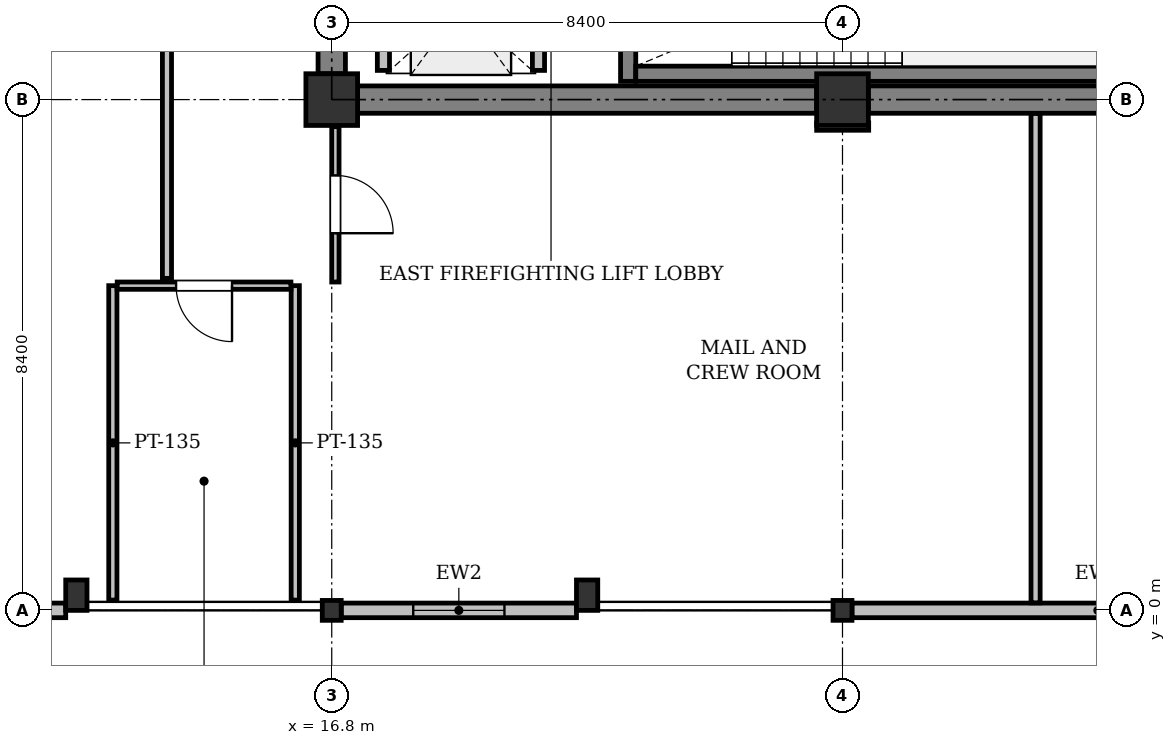
"""IFC4 building model, lengths in metres.
Left out: names, types, materials, properties, quantities, classifications, styles, units other than length and angle.
Written with IfcOpenShell. Run it as: python <this file> out.ifc"""

import sys

from ifc_helpers import new_model, si_unit, direction, frame, frame_2d, origin, origin_2d, place, context, subcontext, project, spatial, rectangle, i_section, extrude, element, fill, save


model = new_model("IFC4")
c1 = context("Model", 3, precision=1e-05, world=origin(), true_north=direction((0.0, 1.0)))
c2 = subcontext(c1, "Body", "Model", "MODEL_VIEW")
j1 = project(units=[si_unit("LENGTHUNIT", "METRE"), si_unit("PLANEANGLEUNIT", "RADIAN")], contexts=[c1])
p1 = place(None, origin())
s1 = spatial("IfcSite", under=j1, at=p1, CompositionType="ELEMENT")
p2 = place(p1, origin())
s2 = spatial("IfcBuilding", under=s1, at=p2, CompositionType="ELEMENT")
p3 = place(p2, frame((0.0, 0.0, 262.2)))
s3 = spatial("IfcBuildingStorey", under=s2, at=p3, CompositionType="ELEMENT", Elevation=262.2)
p4 = place(p3, frame((16.8, 0.0, 0.0), z_axis=(0.0, 0.0, 1.0), x_axis=(1.0, 0.0, 0.0)))
e1 = element("IfcColumn", 1, at=p4, inside=s3, PredefinedType="COLUMN", context=c2, shape_type="SweptSolid", body=[
    extrude(i_section(OverallWidth=0.311, OverallDepth=0.327, WebThickness=0.016, FlangeThickness=0.025, FilletRadius=0.017, at=origin_2d()), origin(), (0.0, 0.0, 1.0), 4.0),
])
p5 = place(p3, frame((16.8, 8.4, 0.0), z_axis=(0.0, 0.0, 1.0), x_axis=(1.0, 0.0, 0.0)))
e2 = element("IfcColumn", 2, at=p5, inside=s3, PredefinedType="COLUMN", context=c2, shape_type="SweptSolid", body=[
    extrude(rectangle(XDim=0.85, YDim=0.85, at=origin_2d()), origin(), (0.0, 0.0, 1.0), 4.0),
])
p6 = place(p3, frame((25.2, 0.0, 0.0), z_axis=(0.0, 0.0, 1.0), x_axis=(1.0, 0.0, 0.0)))
e3 = element("IfcColumn", 3, at=p6, inside=s3, PredefinedType="COLUMN", context=c2, shape_type="SweptSolid", body=[
    extrude(i_section(OverallWidth=0.311, OverallDepth=0.327, WebThickness=0.016, FlangeThickness=0.025, FilletRadius=0.017, at=origin_2d()), origin(), (0.0, 0.0, 1.0), 4.0),
])
p7 = place(p3, frame((25.2, 8.4, 0.0), z_axis=(0.0, 0.0, 1.0), x_axis=(1.0, 0.0, 0.0)))
e4 = element("IfcColumn", 4, at=p7, inside=s3, PredefinedType="COLUMN", context=c2, shape_type="SweptSolid", body=[
    extrude(rectangle(XDim=0.85, YDim=0.85, at=origin_2d()), origin(), (0.0, 0.0, 1.0), 4.0),
])
for number, where, z_axis, x_axis in (
    (5, (12.6, 0.25, 0.0), (0.0, 0.0, 1.0), (1.0, 0.0, 0.0)),
    (6, (21.0, 0.25, 0.0), (0.0, 0.0, 1.0), (1.0, 0.0, 0.0)),
):
    element("IfcColumn", number, at=place(p3, frame(where, z_axis=z_axis, x_axis=x_axis)), inside=s3, PredefinedType="PILASTER", context=c2, shape_type="SweptSolid", body=[
        extrude(rectangle(XDim=0.35, YDim=0.5, at=origin_2d()), origin(), (0.0, 0.0, 1.0), 4.0),
    ])
p8 = place(p3, frame((33.445, 0.0, 0.0), z_axis=(0.0, 0.0, 1.0), x_axis=(-1.0, 0.0, 0.0)))
e7 = element("IfcWall", 7, at=p8, inside=s3, PredefinedType="STANDARD", context=c2, shape_type="SweptSolid", body=[
    extrude(rectangle(XDim=8.089, YDim=0.24, at=frame_2d((4.044, 0.0))), origin(), (0.0, 0.0, 1.0), 3.475),
])
p9 = place(p8, frame((1.77, 0.0, 0.9)))
e8 = element("IfcOpeningElement", 8, at=p9, cuts=e7, PredefinedType="OPENING", context=c2, shape_type="SweptSolid", body=[
    extrude(rectangle(XDim=1.5, YDim=1.6, at=frame_2d((0.75, 0.8))), frame((0.0, 0.13, 0.0), z_axis=(0.0, -1.0, 0.0), x_axis=(1.0, 0.0, 0.0)), (0.0, 0.0, 1.0), 0.26),
])
p10 = place(p3, frame((20.825, 0.0, 0.0), z_axis=(0.0, 0.0, 1.0), x_axis=(-1.0, 0.0, 0.0)))
e9 = element("IfcWall", 9, at=p10, inside=s3, PredefinedType="STANDARD", context=c2, shape_type="SweptSolid", body=[
    extrude(rectangle(XDim=3.869, YDim=0.24, at=frame_2d((1.935, 0.0))), origin(), (0.0, 0.0, 1.0), 3.475),
])
p11 = place(p10, frame((1.185, 0.0, 0.9)))
e10 = element("IfcOpeningElement", 10, at=p11, cuts=e9, PredefinedType="OPENING", context=c2, shape_type="SweptSolid", body=[
    extrude(rectangle(XDim=1.5, YDim=1.6, at=frame_2d((0.75, 0.8))), frame((0.0, 0.13, 0.0), z_axis=(0.0, -1.0, 0.0), x_axis=(1.0, 0.0, 0.0)), (0.0, 0.0, 1.0), 0.26),
])
p12 = place(p3, frame((12.425, 0.0, 0.0), z_axis=(0.0, 0.0, 1.0), x_axis=(-1.0, 0.0, 0.0)))
e11 = element("IfcWall", 11, at=p12, inside=s3, PredefinedType="STANDARD", context=c2, shape_type="SweptSolid", body=[
    extrude(rectangle(XDim=3.87, YDim=0.24, at=frame_2d((1.935, 0.0))), origin(), (0.0, 0.0, 1.0), 3.475),
])
p13 = place(p12, frame((1.185, 0.0, 0.9)))
e12 = element("IfcOpeningElement", 12, at=p13, cuts=e11, PredefinedType="OPENING", context=c2, shape_type="SweptSolid", body=[
    extrude(rectangle(XDim=1.5, YDim=1.6, at=frame_2d((0.75, 0.8))), frame((0.0, 0.13, 0.0), z_axis=(0.0, -1.0, 0.0), x_axis=(1.0, 0.0, 0.0)), (0.0, 0.0, 1.0), 0.26),
])
p14 = place(p3, frame((17.225, 8.4, 0.0), z_axis=(0.0, 0.0, 1.0), x_axis=(1.0, 0.0, 0.0)))
e13 = element("IfcWall", 13, at=p14, inside=s3, PredefinedType="SHEAR", context=c2, shape_type="SweptSolid", body=[
    extrude(rectangle(XDim=7.55, YDim=0.45, at=frame_2d((3.775, 0.0))), origin(), (0.0, 0.0, 1.0), 3.725),
])
p15 = place(p3, frame((25.625, 8.4, 0.0), z_axis=(0.0, 0.0, 1.0), x_axis=(1.0, 0.0, 0.0)))
e14 = element("IfcWall", 14, at=p15, inside=s3, PredefinedType="SHEAR", context=c2, shape_type="SweptSolid", body=[
    extrude(rectangle(XDim=7.55, YDim=0.45, at=frame_2d((3.775, 0.0))), origin(), (0.0, 0.0, 1.0), 3.725),
])
p16 = place(p3, frame((16.8, 8.825, 0.0), z_axis=(0.0, 0.0, 1.0), x_axis=(0.0, 1.0, 0.0)))
e15 = element("IfcWall", 15, at=p16, inside=s3, PredefinedType="SHEAR", context=c2, shape_type="SweptSolid", body=[
    extrude(rectangle(XDim=7.55, YDim=0.45, at=frame_2d((3.775, 0.0))), origin(), (0.0, 0.0, 1.0), 3.725),
])
p17 = place(p16, frame((3.425, 0.0, 0.0)))
e16 = element("IfcOpeningElement", 16, at=p17, cuts=e15, PredefinedType="OPENING", context=c2, shape_type="SweptSolid", body=[
    extrude(rectangle(XDim=1.1, YDim=2.15, at=frame_2d((0.55, 1.075))), frame((0.0, 0.235, 0.0), z_axis=(0.0, -1.0, 0.0), x_axis=(1.0, 0.0, 0.0)), (0.0, 0.0, 1.0), 0.47),
])
p18 = place(p3, frame((21.675, 8.7, 0.0), z_axis=(0.0, 0.0, 1.0), x_axis=(0.0, 1.0, 0.0)))
e17 = element("IfcWall", 17, at=p18, inside=s3, PredefinedType="SHEAR", context=c2, shape_type="SweptSolid", body=[
    extrude(rectangle(XDim=3.75, YDim=0.25, at=frame_2d((1.875, 0.0))), origin(), (0.0, 0.0, 1.0), 3.725),
])
p19 = place(p3, frame((21.8, 8.825, 0.0), z_axis=(0.0, 0.0, 1.0), x_axis=(1.0, 0.0, 0.0)))
e18 = element("IfcWall", 18, at=p19, inside=s3, PredefinedType="SHEAR", context=c2, shape_type="SweptSolid", body=[
    extrude(rectangle(XDim=7.75, YDim=0.25, at=frame_2d((3.875, 0.0))), origin(), (0.0, 0.0, 1.0), 3.725),
])
for number, where, z_axis, x_axis in (
    (19, (20.2, 8.88, 0.0), (0.0, 0.0, 1.0), (0.0, 1.0, 0.0)),
    (20, (17.65, 8.88, 0.0), (0.0, 0.0, 1.0), (0.0, 1.0, 0.0)),
):
    element("IfcWall", number, at=place(p3, frame(where, z_axis=z_axis, x_axis=x_axis)), inside=s3, PredefinedType="PARTITIONING", context=c2, shape_type="SweptSolid", body=[
        extrude(rectangle(XDim=2.1, YDim=0.2, at=frame_2d((1.05, 0.0))), origin(), (0.0, 0.0, 1.0), 3.725),
    ])
for number, where, z_axis, x_axis in (
    (21, (13.2, 5.34, 0.0), (0.0, 0.0, 1.0), (0.0, -1.0, 0.0)),
    (22, (16.2, 0.169, 0.0), (0.0, 0.0, 1.0), (0.0, 1.0, 0.0)),
):
    element("IfcWall", number, at=place(p3, frame(where, z_axis=z_axis, x_axis=x_axis)), inside=s3, PredefinedType="PARTITIONING", context=c2, shape_type="SweptSolid", body=[
        extrude(rectangle(XDim=5.171, YDim=0.135, at=frame_2d((2.585, 0.0))), origin(), (0.0, 0.0, 1.0), 3.725),
    ])
p20 = place(p3, frame((16.128, 5.34, 0.0), z_axis=(0.0, 0.0, 1.0), x_axis=(-1.0, 0.0, 0.0)))
e23 = element("IfcWall", 23, at=p20, inside=s3, PredefinedType="PARTITIONING", context=c2, shape_type="SweptSolid", body=[
    extrude(rectangle(XDim=2.857, YDim=0.12, at=frame_2d((1.428, 0.0))), origin(), (0.0, 0.0, 1.0), 3.725),
])
p21 = place(p20, frame((0.969, 0.0, 0.0)))
e24 = element("IfcOpeningElement", 24, at=p21, cuts=e23, PredefinedType="OPENING", context=c2, shape_type="SweptSolid", body=[
    extrude(rectangle(XDim=0.92, YDim=2.1, at=frame_2d((0.46, 1.05))), frame((0.0, 0.07, 0.0), z_axis=(0.0, -1.0, 0.0), x_axis=(1.0, 0.0, 0.0)), (0.0, 0.0, 1.0), 0.14),
])
p22 = place(p3, frame((28.375, 0.124, 0.0), z_axis=(0.0, 0.0, 1.0), x_axis=(0.0, 1.0, 0.0)))
e25 = element("IfcWall", 25, at=p22, inside=s3, PredefinedType="PARTITIONING", context=c2, shape_type="SweptSolid", body=[
    extrude(rectangle(XDim=8.047, YDim=0.15, at=frame_2d((4.023, 0.0))), origin(), (0.0, 0.0, 1.0), 3.725),
])
p23 = place(p3, frame((25.631, 7.956, 0.0), z_axis=(0.0, 0.0, 1.0), x_axis=(-0.99999963391, -0.000855675671, 0.0)))
e26 = element("IfcWall", 26, at=p23, inside=s3, PredefinedType="PARTITIONING", context=c2, shape_type="SweptSolid", body=[
    extrude(rectangle(XDim=0.856, YDim=0.12, at=frame_2d((0.428, 0.0))), origin(), (0.0, 0.0, 1.0), 3.319),
])
p24 = place(p3, frame((16.86, 7.955, 0.0), z_axis=(0.0, 0.0, 1.0), x_axis=(0.0, -1.0, 0.0)))
e27 = element("IfcWall", 27, at=p24, inside=s3, PredefinedType="PARTITIONING", context=c2, shape_type="SweptSolid", body=[
    extrude(rectangle(XDim=2.555, YDim=0.12, at=frame_2d((1.278, 0.0))), origin(), (0.0, 0.0, 1.0), 3.319),
])
p25 = place(p24, frame((0.802, 0.0, 0.0)))
e28 = element("IfcOpeningElement", 28, at=p25, cuts=e27, PredefinedType="OPENING", context=c2, shape_type="SweptSolid", body=[
    extrude(rectangle(XDim=0.95, YDim=2.15, at=frame_2d((0.475, 1.075))), frame((0.0, 0.07, 0.0), z_axis=(0.0, -1.0, 0.0), x_axis=(1.0, 0.0, 0.0)), (0.0, 0.0, 1.0), 0.14),
])
p26 = place(p3, frame((14.09, 5.46, 0.0), z_axis=(0.0, 0.0, 1.0), x_axis=(0.0, 1.0, 0.0)))
e29 = element("IfcWall", 29, at=p26, inside=s3, PredefinedType="PARTITIONING", context=c2, shape_type="SweptSolid", body=[
    extrude(rectangle(XDim=7.88, YDim=0.15, at=frame_2d((3.94, 0.0))), origin(), (0.0, 0.0, 1.0), 3.271),
])
p27 = place(p11, origin())
e30 = element("IfcWindow", 30, at=p27, inside=s3, PartitioningType="SINGLE_PANEL", PredefinedType="WINDOW", context=c2, shape_type="SweptSolid", body=[
    extrude(rectangle(XDim=1.5, YDim=1.6, at=frame_2d((0.75, 0.8))), frame((0.0, 0.03, 0.0), z_axis=(0.0, -1.0, 0.0), x_axis=(1.0, 0.0, 0.0)), (0.0, 0.0, 1.0), 0.06),
])
fill(e10, e30)
p28 = place(p21, origin())
e31 = element("IfcDoor", 31, at=p28, inside=s3, OperationType="SINGLE_SWING_LEFT", PredefinedType="DOOR", context=c2, shape_type="SweptSolid", body=[
    extrude(rectangle(XDim=0.92, YDim=2.1, at=frame_2d((0.46, 1.05))), frame((0.0, 0.025, 0.0), z_axis=(0.0, -1.0, 0.0), x_axis=(1.0, 0.0, 0.0)), (0.0, 0.0, 1.0), 0.05),
])
fill(e24, e31)
p29 = place(p25, origin())
e32 = element("IfcDoor", 32, at=p29, inside=s3, OperationType="SINGLE_SWING_RIGHT", PredefinedType="DOOR", context=c2, shape_type="SweptSolid", body=[
    extrude(rectangle(XDim=0.95, YDim=2.15, at=frame_2d((0.475, 1.075))), frame((0.0, 0.025, 0.0), z_axis=(0.0, -1.0, 0.0), x_axis=(1.0, 0.0, 0.0)), (0.0, 0.0, 1.0), 0.05),
])
fill(e28, e32)
save(model, sys.argv[1])
